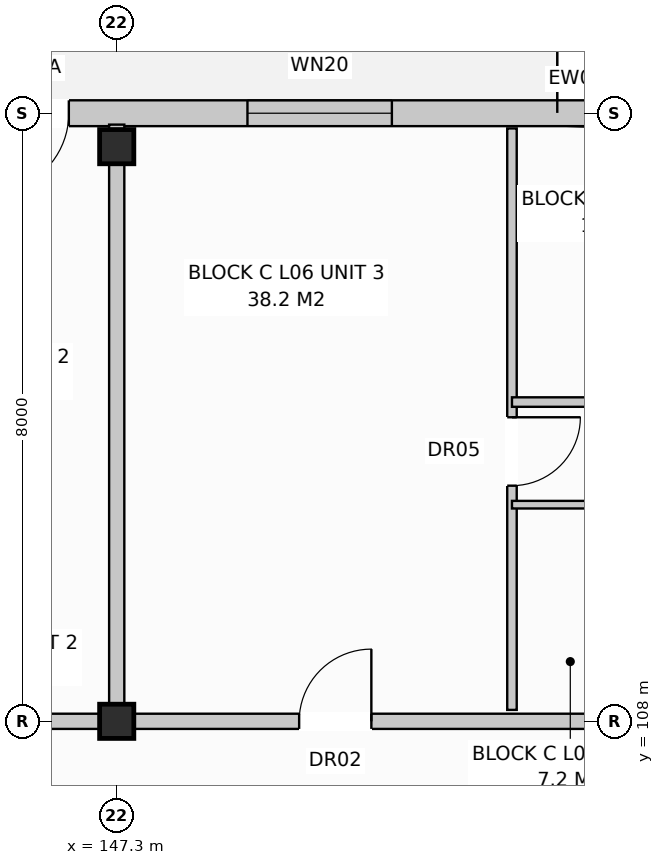
"""IFC4 building model, lengths in metres.
Left out: names, types, materials, properties, quantities, classifications, styles, units other than length and angle.
Written with IfcOpenShell. Run it as: python <this file> out.ifc"""

import sys

from ifc_helpers import new_model, si_unit, direction, frame, frame_2d, origin, origin_with_axes, origin_2d, place, context, subcontext, project, spatial, rectangle, extrude, element, fill, save


model = new_model("IFC4")
c1 = context("Model", 3, precision=1e-05, world=origin(), true_north=direction((0.0, 1.0)))
c2 = subcontext(c1, "Body", "Model", "MODEL_VIEW")
j1 = project(units=[si_unit("LENGTHUNIT", "METRE"), si_unit("PLANEANGLEUNIT", "RADIAN")], contexts=[c1])
p1 = place(None, origin())
s1 = spatial("IfcSite", under=j1, at=p1, CompositionType="ELEMENT")
p2 = place(p1, origin())
s2 = spatial("IfcBuilding", under=s1, at=p2, CompositionType="ELEMENT")
p3 = place(p2, frame((0.0, 0.0, 20.8)))
s3 = spatial("IfcBuildingStorey", under=s2, at=p3, CompositionType="ELEMENT", Elevation=20.8)
for number, where, z_axis, x_axis in (
    (1, (147.3, 108.0, 0.0), (0.0, 0.0, 1.0), (1.0, 0.0, 0.0)),
    (2, (147.3, 115.56, 0.0), (0.0, 0.0, 1.0), (1.0, 0.0, 0.0)),
):
    element("IfcColumn", number, at=place(p3, frame(where, z_axis=z_axis, x_axis=x_axis)), inside=s3, PredefinedType="COLUMN", context=c2, shape_type="SweptSolid", body=[
        extrude(rectangle(XDim=0.45, YDim=0.45, at=origin_2d()), origin(), (0.0, 0.0, 1.0), 3.2),
    ])
p4 = place(p3, frame((126.76, 116.0, 0.0), z_axis=(0.0, 0.0, 1.0), x_axis=(1.0, 0.0, 0.0)))
e3 = element("IfcWall", 3, at=p4, inside=s3, PredefinedType="STANDARD", context=c2, shape_type="SweptSolid", body=[
    extrude(rectangle(XDim=41.08, YDim=0.34, at=frame_2d((20.54, 0.0))), origin(), (0.0, 0.0, 1.0), 2.95),
])
p5 = place(p4, frame((2.464, 0.0, 0.0)))
e4 = element("IfcOpeningElement", 4, at=p5, cuts=e3, PredefinedType="OPENING", context=c2, shape_type="SweptSolid", body=[
    extrude(rectangle(XDim=1.05, YDim=2.12, at=frame_2d((0.525, 1.06))), frame((0.0, 0.182, 0.0), z_axis=(0.0, -1.0, 0.0), x_axis=(1.0, 0.0, 0.0)), (0.0, 0.0, 1.0), 0.364),
])
p6 = place(p4, frame((18.86, 0.0, 0.0)))
e5 = element("IfcOpeningElement", 5, at=p6, cuts=e3, PredefinedType="OPENING", context=c2, shape_type="SweptSolid", body=[
    extrude(rectangle(XDim=1.05, YDim=2.12, at=frame_2d((0.525, 1.06))), frame((0.0, 0.182, 0.0), z_axis=(0.0, -1.0, 0.0), x_axis=(1.0, 0.0, 0.0)), (0.0, 0.0, 1.0), 0.364),
])
p7 = place(p4, frame((28.764, 0.0, 0.0)))
e6 = element("IfcOpeningElement", 6, at=p7, cuts=e3, PredefinedType="OPENING", context=c2, shape_type="SweptSolid", body=[
    extrude(rectangle(XDim=1.05, YDim=2.12, at=frame_2d((0.525, 1.06))), frame((0.0, 0.182, 0.0), z_axis=(0.0, -1.0, 0.0), x_axis=(1.0, 0.0, 0.0)), (0.0, 0.0, 1.0), 0.364),
])
p8 = place(p4, frame((0.76, 0.0, 0.72)))
e7 = element("IfcOpeningElement", 7, at=p8, cuts=e3, PredefinedType="OPENING", context=c2, shape_type="SweptSolid", body=[
    extrude(rectangle(XDim=1.1, YDim=1.5, at=frame_2d((0.55, 0.75))), frame((0.0, 0.182, 0.0), z_axis=(0.0, -1.0, 0.0), x_axis=(1.0, 0.0, 0.0)), (0.0, 0.0, 1.0), 0.364),
])
p9 = place(p4, frame((4.31, 0.0, 0.8)))
e8 = element("IfcOpeningElement", 8, at=p9, cuts=e3, PredefinedType="OPENING", context=c2, shape_type="SweptSolid", body=[
    extrude(rectangle(XDim=1.8, YDim=1.7, at=frame_2d((0.9, 0.85))), frame((0.0, 0.182, 0.0), z_axis=(0.0, -1.0, 0.0), x_axis=(1.0, 0.0, 0.0)), (0.0, 0.0, 1.0), 0.364),
])
p10 = place(p4, frame((7.96, 0.0, 0.72)))
e9 = element("IfcOpeningElement", 9, at=p10, cuts=e3, PredefinedType="OPENING", context=c2, shape_type="SweptSolid", body=[
    extrude(rectangle(XDim=1.9, YDim=1.85, at=frame_2d((0.95, 0.925))), frame((0.0, 0.182, 0.0), z_axis=(0.0, -1.0, 0.0), x_axis=(1.0, 0.0, 0.0)), (0.0, 0.0, 1.0), 0.364),
])
p11 = place(p4, frame((11.66, 0.0, 0.72)))
e10 = element("IfcOpeningElement", 10, at=p11, cuts=e3, PredefinedType="OPENING", context=c2, shape_type="SweptSolid", body=[
    extrude(rectangle(XDim=1.1, YDim=1.5, at=frame_2d((0.55, 0.75))), frame((0.0, 0.182, 0.0), z_axis=(0.0, -1.0, 0.0), x_axis=(1.0, 0.0, 0.0)), (0.0, 0.0, 1.0), 0.364),
])
p12 = place(p4, frame((16.81, 0.0, 0.8)))
e11 = element("IfcOpeningElement", 11, at=p12, cuts=e3, PredefinedType="OPENING", context=c2, shape_type="SweptSolid", body=[
    extrude(rectangle(XDim=1.8, YDim=1.7, at=frame_2d((0.9, 0.85))), frame((0.0, 0.182, 0.0), z_axis=(0.0, -1.0, 0.0), x_axis=(1.0, 0.0, 0.0)), (0.0, 0.0, 1.0), 0.364),
])
p13 = place(p4, frame((22.26, 0.0, 0.72)))
e12 = element("IfcOpeningElement", 12, at=p13, cuts=e3, PredefinedType="OPENING", context=c2, shape_type="SweptSolid", body=[
    extrude(rectangle(XDim=1.9, YDim=1.85, at=frame_2d((0.95, 0.925))), frame((0.0, 0.182, 0.0), z_axis=(0.0, -1.0, 0.0), x_axis=(1.0, 0.0, 0.0)), (0.0, 0.0, 1.0), 0.364),
])
p14 = place(p4, frame((31.135, 0.0, 0.8)))
e13 = element("IfcOpeningElement", 13, at=p14, cuts=e3, PredefinedType="OPENING", context=c2, shape_type="SweptSolid", body=[
    extrude(rectangle(XDim=1.95, YDim=1.65, at=frame_2d((0.975, 0.825))), frame((0.0, 0.182, 0.0), z_axis=(0.0, -1.0, 0.0), x_axis=(1.0, 0.0, 0.0)), (0.0, 0.0, 1.0), 0.364),
])
p15 = place(p4, frame((35.61, 0.0, 0.8)))
e14 = element("IfcOpeningElement", 14, at=p15, cuts=e3, PredefinedType="OPENING", context=c2, shape_type="SweptSolid", body=[
    extrude(rectangle(XDim=1.8, YDim=1.7, at=frame_2d((0.9, 0.85))), frame((0.0, 0.182, 0.0), z_axis=(0.0, -1.0, 0.0), x_axis=(1.0, 0.0, 0.0)), (0.0, 0.0, 1.0), 0.364),
])
p16 = place(p4, frame((39.26, 0.0, 0.72)))
e15 = element("IfcOpeningElement", 15, at=p16, cuts=e3, PredefinedType="OPENING", context=c2, shape_type="SweptSolid", body=[
    extrude(rectangle(XDim=1.1, YDim=1.5, at=frame_2d((0.55, 0.75))), frame((0.0, 0.182, 0.0), z_axis=(0.0, -1.0, 0.0), x_axis=(1.0, 0.0, 0.0)), (0.0, 0.0, 1.0), 0.364),
])
p17 = place(p3, frame((147.3, 108.15, 0.0), z_axis=(0.0, 0.0, 1.0), x_axis=(0.0, 1.0, 0.0)))
e16 = element("IfcWall", 16, at=p17, inside=s3, PredefinedType="PARTITIONING", context=c2, shape_type="SweptSolid", body=[
    extrude(rectangle(XDim=7.7, YDim=0.2, at=frame_2d((3.85, 0.0))), origin(), (0.0, 0.0, 1.0), 2.95),
])
p18 = place(p3, frame((133.5, 108.0, 0.0), z_axis=(0.0, 0.0, 1.0), x_axis=(1.0, 0.0, 0.0)))
e17 = element("IfcWall", 17, at=p18, inside=s3, PredefinedType="PARTITIONING", context=c2, shape_type="SweptSolid", body=[
    extrude(rectangle(XDim=13.8, YDim=0.2, at=frame_2d((6.9, 0.0))), origin(), (0.0, 0.0, 1.0), 2.39),
])
p19 = place(p18, frame((9.6, 0.0, 0.0)))
e18 = element("IfcOpeningElement", 18, at=p19, cuts=e17, PredefinedType="OPENING", context=c2, shape_type="SweptSolid", body=[
    extrude(rectangle(XDim=0.95, YDim=2.15, at=frame_2d((0.475, 1.075))), frame((0.0, 0.112, 0.0), z_axis=(0.0, -1.0, 0.0), x_axis=(1.0, 0.0, 0.0)), (0.0, 0.0, 1.0), 0.224),
])
p20 = place(p3, frame((147.3, 108.0, 0.0), z_axis=(0.0, 0.0, 1.0), x_axis=(1.0, 0.0, 0.0)))
e19 = element("IfcWall", 19, at=p20, inside=s3, PredefinedType="PARTITIONING", context=c2, shape_type="SweptSolid", body=[
    extrude(rectangle(XDim=13.8, YDim=0.2, at=frame_2d((6.9, 0.0))), origin(), (0.0, 0.0, 1.0), 2.39),
])
p21 = place(p20, frame((2.4, 0.0, 0.0)))
e20 = element("IfcOpeningElement", 20, at=p21, cuts=e19, PredefinedType="OPENING", context=c2, shape_type="SweptSolid", body=[
    extrude(rectangle(XDim=0.95, YDim=2.15, at=frame_2d((0.475, 1.075))), frame((0.0, 0.112, 0.0), z_axis=(0.0, -1.0, 0.0), x_axis=(1.0, 0.0, 0.0)), (0.0, 0.0, 1.0), 0.224),
])
p22 = place(p3, frame((152.5, 108.15, 0.0), z_axis=(0.0, 0.0, 1.0), x_axis=(0.0, 1.0, 0.0)))
e21 = element("IfcWall", 21, at=p22, inside=s3, PredefinedType="PARTITIONING", context=c2, shape_type="SweptSolid", body=[
    extrude(rectangle(XDim=7.65, YDim=0.125, at=frame_2d((3.825, 0.0))), origin(), (0.0, 0.0, 1.0), 2.59),
])
p23 = place(p22, frame((2.95, 0.0, 0.0)))
e22 = element("IfcOpeningElement", 22, at=p23, cuts=e21, PredefinedType="OPENING", context=c2, shape_type="SweptSolid", body=[
    extrude(rectangle(XDim=0.9, YDim=2.1, at=frame_2d((0.45, 1.05))), frame((0.0, 0.074, 0.0), z_axis=(0.0, -1.0, 0.0), x_axis=(1.0, 0.0, 0.0)), (0.0, 0.0, 1.0), 0.149),
])
p24 = place(p3, frame((152.5, 110.85, 0.0), z_axis=(0.0, 0.0, 1.0), x_axis=(1.0, 0.0, 0.0)))
e23 = element("IfcWall", 23, at=p24, inside=s3, PredefinedType="PARTITIONING", context=c2, shape_type="SweptSolid", body=[
    extrude(rectangle(XDim=8.5, YDim=0.1, at=frame_2d((4.25, 0.0))), origin(), (0.0, 0.0, 1.0), 2.95),
])
p25 = place(p24, frame((1.0, 0.0, 0.0)))
e24 = element("IfcOpeningElement", 24, at=p25, cuts=e23, PredefinedType="OPENING", context=c2, shape_type="SweptSolid", body=[
    extrude(rectangle(XDim=0.85, YDim=2.1, at=frame_2d((0.425, 1.05))), frame((0.0, 0.062, 0.0), z_axis=(0.0, -1.0, 0.0), x_axis=(1.0, 0.0, 0.0)), (0.0, 0.0, 1.0), 0.124),
])
p26 = place(p24, frame((3.4, 0.0, 0.0)))
e25 = element("IfcOpeningElement", 25, at=p26, cuts=e23, PredefinedType="OPENING", context=c2, shape_type="SweptSolid", body=[
    extrude(rectangle(XDim=0.85, YDim=2.05, at=frame_2d((0.425, 1.025))), frame((0.0, 0.062, 0.0), z_axis=(0.0, -1.0, 0.0), x_axis=(1.0, 0.0, 0.0)), (0.0, 0.0, 1.0), 0.124),
])
p27 = place(p24, frame((6.2, 0.0, 0.0)))
e26 = element("IfcOpeningElement", 26, at=p27, cuts=e23, PredefinedType="OPENING", context=c2, shape_type="SweptSolid", body=[
    extrude(rectangle(XDim=0.85, YDim=2.05, at=frame_2d((0.425, 1.025))), frame((0.0, 0.062, 0.0), z_axis=(0.0, -1.0, 0.0), x_axis=(1.0, 0.0, 0.0)), (0.0, 0.0, 1.0), 0.124),
])
p28 = place(p3, frame((152.5, 112.2, 0.0), z_axis=(0.0, 0.0, 1.0), x_axis=(1.0, 0.0, 0.0)))
e27 = element("IfcWall", 27, at=p28, inside=s3, PredefinedType="PARTITIONING", context=c2, shape_type="SweptSolid", body=[
    extrude(rectangle(XDim=8.5, YDim=0.125, at=frame_2d((4.25, 0.0))), origin(), (0.0, 0.0, 1.0), 2.95),
])
p29 = place(p28, frame((1.5, 0.0, 0.0)))
e28 = element("IfcOpeningElement", 28, at=p29, cuts=e27, PredefinedType="OPENING", context=c2, shape_type="SweptSolid", body=[
    extrude(rectangle(XDim=0.9, YDim=2.1, at=frame_2d((0.45, 1.05))), frame((0.0, 0.074, 0.0), z_axis=(0.0, -1.0, 0.0), x_axis=(1.0, 0.0, 0.0)), (0.0, 0.0, 1.0), 0.149),
])
p30 = place(p28, frame((5.6, 0.0, 0.0)))
e29 = element("IfcOpeningElement", 29, at=p30, cuts=e27, PredefinedType="OPENING", context=c2, shape_type="SweptSolid", body=[
    extrude(rectangle(XDim=0.9, YDim=2.1, at=frame_2d((0.45, 1.05))), frame((0.0, 0.074, 0.0), z_axis=(0.0, -1.0, 0.0), x_axis=(1.0, 0.0, 0.0)), (0.0, 0.0, 1.0), 0.149),
])
p31 = place(p6, frame((1.05, 0.0, 0.0), z_axis=(0.0, 0.0, 1.0), x_axis=(-1.0, 0.0, 0.0)))
e30 = element("IfcDoor", 30, at=p31, inside=s3, OperationType="SINGLE_SWING_LEFT", PredefinedType="DOOR", context=c2, shape_type="SweptSolid", body=[
    extrude(rectangle(XDim=1.05, YDim=2.12, at=frame_2d((0.525, 1.06))), frame((0.0, 0.025, 0.0), z_axis=(0.0, -1.0, 0.0), x_axis=(1.0, 0.0, 0.0)), (0.0, 0.0, 1.0), 0.05),
])
fill(e5, e30)
p32 = place(p13, origin_with_axes())
e31 = element("IfcWindow", 31, at=p32, inside=s3, PartitioningType="SINGLE_PANEL", PredefinedType="WINDOW", context=c2, shape_type="SweptSolid", body=[
    extrude(rectangle(XDim=1.9, YDim=1.85, at=frame_2d((0.95, 0.925))), frame((0.0, 0.03, 0.0), z_axis=(0.0, -1.0, 0.0), x_axis=(1.0, 0.0, 0.0)), (0.0, 0.0, 1.0), 0.06),
])
fill(e12, e31)
p33 = place(p21, origin_with_axes())
e32 = element("IfcDoor", 32, at=p33, inside=s3, OperationType="SINGLE_SWING_RIGHT", PredefinedType="DOOR", context=c2, shape_type="SweptSolid", body=[
    extrude(rectangle(XDim=0.95, YDim=2.15, at=frame_2d((0.475, 1.075))), frame((0.0, 0.025, 0.0), z_axis=(0.0, -1.0, 0.0), x_axis=(1.0, 0.0, 0.0)), (0.0, 0.0, 1.0), 0.05),
])
fill(e20, e32)
p34 = place(p23, frame((0.9, 0.0, 0.0), z_axis=(0.0, 0.0, 1.0), x_axis=(-1.0, 0.0, 0.0)))
e33 = element("IfcDoor", 33, at=p34, inside=s3, OperationType="SINGLE_SWING_RIGHT", PredefinedType="DOOR", context=c2, shape_type="SweptSolid", body=[
    extrude(rectangle(XDim=0.9, YDim=2.1, at=frame_2d((0.45, 1.05))), frame((0.0, 0.025, 0.0), z_axis=(0.0, -1.0, 0.0), x_axis=(1.0, 0.0, 0.0)), (0.0, 0.0, 1.0), 0.05),
])
fill(e22, e33)
save(model, sys.argv[1])
